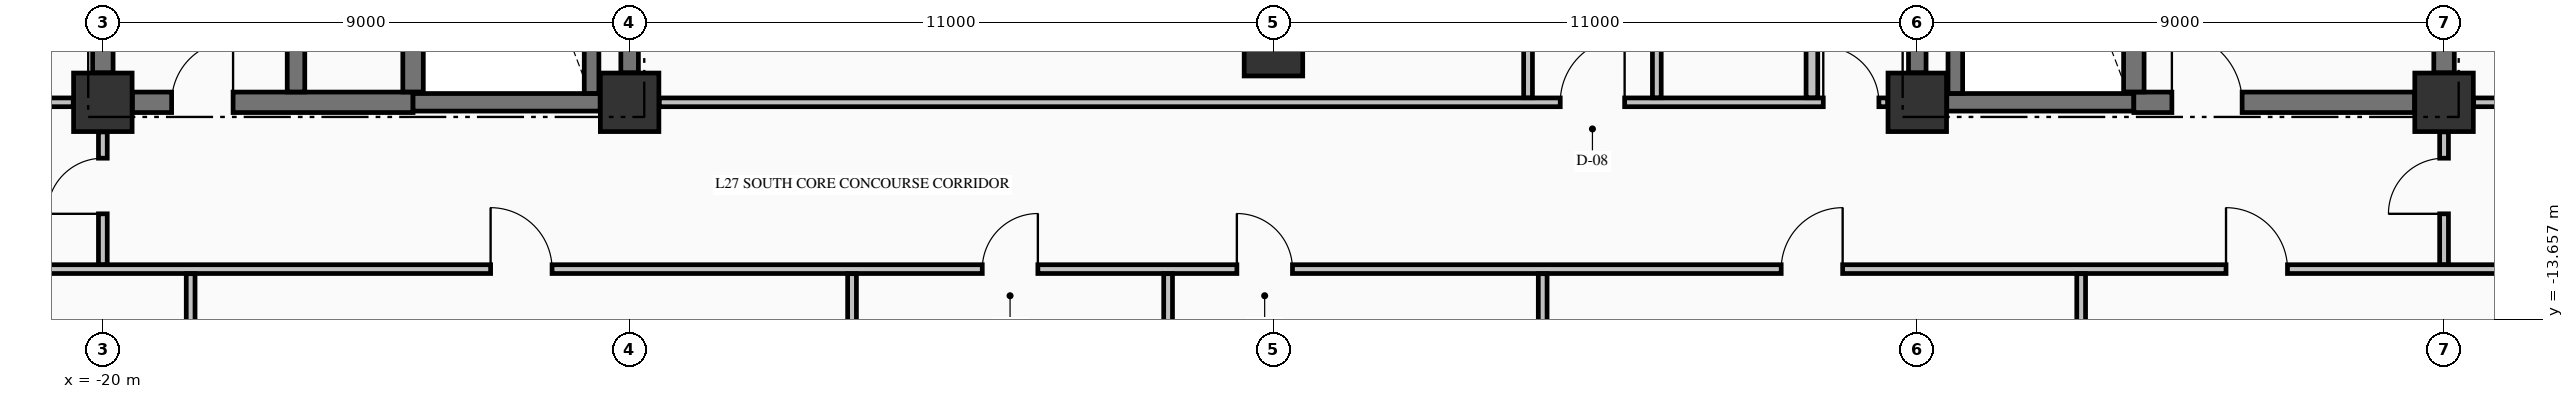
"""IFC4 building model, lengths in metres.
Left out: names, types, materials, properties, quantities, classifications, styles, units other than length and angle.
Written with IfcOpenShell. Run it as: python <this file> out.ifc"""

import sys

from ifc_helpers import new_model, si_unit, direction, frame, frame_2d, origin, origin_2d, place, context, subcontext, project, spatial, rectangle, extrude, element, fill, save


model = new_model("IFC4")
c1 = context("Model", 3, precision=1e-05, world=origin(), true_north=direction((0.0, 1.0)))
c2 = subcontext(c1, "Body", "Model", "MODEL_VIEW")
j1 = project(units=[si_unit("LENGTHUNIT", "METRE"), si_unit("PLANEANGLEUNIT", "RADIAN")], contexts=[c1])
p1 = place(None, origin())
s1 = spatial("IfcSite", under=j1, at=p1, CompositionType="ELEMENT")
p2 = place(p1, origin())
s2 = spatial("IfcBuilding", under=s1, at=p2, CompositionType="ELEMENT")
p3 = place(p2, frame((0.0, 0.0, 109.21)))
s3 = spatial("IfcBuildingStorey", under=s2, at=p3, CompositionType="ELEMENT", Elevation=109.21)
for number, where, z_axis, x_axis in (
    (1, (-20.0, -9.95, -0.25), (0.0, 0.0, 1.0), (1.0, 0.0, 0.0)),
    (2, (-11.0, -9.95, -0.25), (0.0, 0.0, 1.0), (1.0, 0.0, 0.0)),
    (3, (11.0, -9.95, -0.25), (0.0, 0.0, 1.0), (1.0, 0.0, 0.0)),
    (4, (20.0, -9.95, -0.25), (0.0, 0.0, 1.0), (1.0, 0.0, 0.0)),
    (5, (0.0, -9.0, -0.25), (0.0, 0.0, 1.0), (1.0, 0.0, 0.0)),
):
    element("IfcColumn", number, at=place(p3, frame(where, z_axis=z_axis, x_axis=x_axis)), inside=s3, PredefinedType="COLUMN", context=c2, shape_type="SweptSolid", body=[
        extrude(rectangle(XDim=1.0, YDim=1.0, at=origin_2d()), origin(), (0.0, 0.0, 1.0), 3.57),
    ])
p4 = place(p3, frame((-19.496, -9.95, 0.0), z_axis=(0.0, 0.0, 1.0), x_axis=(1.0, 0.0, 0.0)))
e6 = element("IfcWall", 6, at=p4, inside=s3, PredefinedType="SHEAR", context=c2, shape_type="SweptSolid", body=[
    extrude(rectangle(XDim=4.796, YDim=0.35, at=frame_2d((2.398, 0.0))), origin(), (0.0, 0.0, 1.0), 3.32),
])
p5 = place(p4, frame((0.671, 0.0, 0.0)))
e7 = element("IfcOpeningElement", 7, at=p5, cuts=e6, PredefinedType="OPENING", context=c2, shape_type="SweptSolid", body=[
    extrude(rectangle(XDim=1.05, YDim=2.15, at=frame_2d((0.525, 1.075))), frame((0.0, 0.185, 0.0), z_axis=(0.0, -1.0, 0.0), x_axis=(1.0, 0.0, 0.0)), (0.0, 0.0, 1.0), 0.37),
])
for number, where, z_axis, x_axis in (
    (8, (-14.7, -9.95, 0.0), (0.0, 0.0, 1.0), (1.0, 0.0, 0.0)),
    (9, (11.504, -9.95, 0.0), (0.0, 0.0, 1.0), (1.0, 0.0, 0.0)),
):
    element("IfcWall", number, at=place(p3, frame(where, z_axis=z_axis, x_axis=x_axis)), inside=s3, PredefinedType="SHEAR", context=c2, shape_type="SweptSolid", body=[
        extrude(rectangle(XDim=3.196, YDim=0.3, at=frame_2d((1.598, 0.0))), origin(), (0.0, 0.0, 1.0), 3.32),
    ])
p6 = place(p3, frame((14.7, -9.95, 0.0), z_axis=(0.0, 0.0, 1.0), x_axis=(1.0, 0.0, 0.0)))
e10 = element("IfcWall", 10, at=p6, inside=s3, PredefinedType="SHEAR", context=c2, shape_type="SweptSolid", body=[
    extrude(rectangle(XDim=4.796, YDim=0.35, at=frame_2d((2.398, 0.0))), origin(), (0.0, 0.0, 1.0), 3.32),
])
p7 = place(p6, frame((0.65, 0.0, 0.0)))
e11 = element("IfcOpeningElement", 11, at=p7, cuts=e10, PredefinedType="OPENING", context=c2, shape_type="SweptSolid", body=[
    extrude(rectangle(XDim=1.2, YDim=2.15, at=frame_2d((0.6, 1.075))), frame((0.0, 0.185, 0.0), z_axis=(0.0, -1.0, 0.0), x_axis=(1.0, 0.0, 0.0)), (0.0, 0.0, 1.0), 0.37),
])
p8 = place(p3, frame((-22.835, -12.8, 0.0), z_axis=(0.0, 0.0, 1.0), x_axis=(1.0, 0.0, 0.0)))
e12 = element("IfcWall", 12, at=p8, inside=s3, PredefinedType="PARTITIONING", context=c2, shape_type="SweptSolid", body=[
    extrude(rectangle(XDim=50.67, YDim=0.15, at=frame_2d((25.335, 0.0))), origin(), (0.0, 0.0, 1.0), 3.32),
])
p9 = place(p8, frame((9.46, 0.0, 0.0)))
e13 = element("IfcOpeningElement", 13, at=p9, cuts=e12, PredefinedType="OPENING", context=c2, shape_type="SweptSolid", body=[
    extrude(rectangle(XDim=1.05, YDim=2.15, at=frame_2d((0.525, 1.075))), frame((0.0, 0.085, 0.0), z_axis=(0.0, -1.0, 0.0), x_axis=(1.0, 0.0, 0.0)), (0.0, 0.0, 1.0), 0.17),
])
p10 = place(p8, frame((17.86, 0.0, 0.0)))
e14 = element("IfcOpeningElement", 14, at=p10, cuts=e12, PredefinedType="OPENING", context=c2, shape_type="SweptSolid", body=[
    extrude(rectangle(XDim=0.95, YDim=2.15, at=frame_2d((0.475, 1.075))), frame((0.0, 0.085, 0.0), z_axis=(0.0, -1.0, 0.0), x_axis=(1.0, 0.0, 0.0)), (0.0, 0.0, 1.0), 0.17),
])
p11 = place(p8, frame((22.21, 0.0, 0.0)))
e15 = element("IfcOpeningElement", 15, at=p11, cuts=e12, PredefinedType="OPENING", context=c2, shape_type="SweptSolid", body=[
    extrude(rectangle(XDim=0.95, YDim=2.15, at=frame_2d((0.475, 1.075))), frame((0.0, 0.085, 0.0), z_axis=(0.0, -1.0, 0.0), x_axis=(1.0, 0.0, 0.0)), (0.0, 0.0, 1.0), 0.17),
])
p12 = place(p8, frame((31.51, 0.0, 0.0)))
e16 = element("IfcOpeningElement", 16, at=p12, cuts=e12, PredefinedType="OPENING", context=c2, shape_type="SweptSolid", body=[
    extrude(rectangle(XDim=1.05, YDim=2.15, at=frame_2d((0.525, 1.075))), frame((0.0, 0.085, 0.0), z_axis=(0.0, -1.0, 0.0), x_axis=(1.0, 0.0, 0.0)), (0.0, 0.0, 1.0), 0.17),
])
p13 = place(p8, frame((39.11, 0.0, 0.0)))
e17 = element("IfcOpeningElement", 17, at=p13, cuts=e12, PredefinedType="OPENING", context=c2, shape_type="SweptSolid", body=[
    extrude(rectangle(XDim=1.05, YDim=2.15, at=frame_2d((0.525, 1.075))), frame((0.0, 0.085, 0.0), z_axis=(0.0, -1.0, 0.0), x_axis=(1.0, 0.0, 0.0)), (0.0, 0.0, 1.0), 0.17),
])
p14 = place(p3, frame((-22.835, -9.95, 0.0), z_axis=(0.0, 0.0, 1.0), x_axis=(1.0, 0.0, 0.0)))
e18 = element("IfcWall", 18, at=p14, inside=s3, PredefinedType="PARTITIONING", context=c2, shape_type="SweptSolid", body=[
    extrude(rectangle(XDim=2.329, YDim=0.15, at=frame_2d((1.165, 0.0))), origin(), (0.0, 0.0, 1.0), 3.32),
])
p15 = place(p14, frame((0.835, 0.0, 0.0)))
e19 = element("IfcOpeningElement", 19, at=p15, cuts=e18, PredefinedType="OPENING", context=c2, shape_type="SweptSolid", body=[
    extrude(rectangle(XDim=1.0, YDim=2.15, at=frame_2d((0.5, 1.075))), frame((0.0, 0.085, 0.0), z_axis=(0.0, -1.0, 0.0), x_axis=(1.0, 0.0, 0.0)), (0.0, 0.0, 1.0), 0.17),
])
p16 = place(p3, frame((-10.494, -9.95, 0.0), z_axis=(0.0, 0.0, 1.0), x_axis=(1.0, 0.0, 0.0)))
e20 = element("IfcWall", 20, at=p16, inside=s3, PredefinedType="PARTITIONING", context=c2, shape_type="SweptSolid", body=[
    extrude(rectangle(XDim=20.988, YDim=0.15, at=frame_2d((10.494, 0.0))), origin(), (0.0, 0.0, 1.0), 3.32),
])
p17 = place(p16, frame((15.394, 0.0, 0.0)))
e21 = element("IfcOpeningElement", 21, at=p17, cuts=e20, PredefinedType="OPENING", context=c2, shape_type="SweptSolid", body=[
    extrude(rectangle(XDim=1.1, YDim=2.15, at=frame_2d((0.55, 1.075))), frame((0.0, 0.085, 0.0), z_axis=(0.0, -1.0, 0.0), x_axis=(1.0, 0.0, 0.0)), (0.0, 0.0, 1.0), 0.17),
])
p18 = place(p16, frame((19.888, 0.0, 0.0)))
e22 = element("IfcOpeningElement", 22, at=p18, cuts=e20, PredefinedType="OPENING", context=c2, shape_type="SweptSolid", body=[
    extrude(rectangle(XDim=0.95, YDim=2.15, at=frame_2d((0.475, 1.075))), frame((0.0, 0.085, 0.0), z_axis=(0.0, -1.0, 0.0), x_axis=(1.0, 0.0, 0.0)), (0.0, 0.0, 1.0), 0.17),
])
p19 = place(p3, frame((20.506, -9.95, 0.0), z_axis=(0.0, 0.0, 1.0), x_axis=(1.0, 0.0, 0.0)))
e23 = element("IfcWall", 23, at=p19, inside=s3, PredefinedType="PARTITIONING", context=c2, shape_type="SweptSolid", body=[
    extrude(rectangle(XDim=7.329, YDim=0.15, at=frame_2d((3.665, 0.0))), origin(), (0.0, 0.0, 1.0), 3.32),
])
p20 = place(p19, frame((3.019, 0.0, 0.0)))
e24 = element("IfcOpeningElement", 24, at=p20, cuts=e23, PredefinedType="OPENING", context=c2, shape_type="SweptSolid", body=[
    extrude(rectangle(XDim=0.95, YDim=2.15, at=frame_2d((0.475, 1.075))), frame((0.0, 0.085, 0.0), z_axis=(0.0, -1.0, 0.0), x_axis=(1.0, 0.0, 0.0)), (0.0, 0.0, 1.0), 0.17),
])
p21 = place(p3, frame((-20.0, -9.446, 0.0), z_axis=(0.0, 0.0, 1.0), x_axis=(0.0, 1.0, 0.0)))
e25 = element("IfcWall", 25, at=p21, inside=s3, PredefinedType="SHEAR", context=c2, shape_type="SweptSolid", body=[
    extrude(rectangle(XDim=8.942, YDim=0.35, at=frame_2d((4.471, 0.0))), origin(), (0.0, 0.0, 1.0), 3.32),
])
p22 = place(p3, frame((-16.7, -9.773, 0.0), z_axis=(0.0, 0.0, 1.0), x_axis=(0.0, 1.0, 0.0)))
e26 = element("IfcWall", 26, at=p22, inside=s3, PredefinedType="SHEAR", context=c2, shape_type="SweptSolid", body=[
    extrude(rectangle(XDim=9.371, YDim=0.3, at=frame_2d((4.686, 0.0))), origin(), (0.0, 0.0, 1.0), 3.32),
])
p23 = place(p3, frame((-14.7, -9.773, 0.0), z_axis=(0.0, 0.0, 1.0), x_axis=(0.0, 1.0, 0.0)))
e27 = element("IfcWall", 27, at=p23, inside=s3, PredefinedType="SHEAR", context=c2, shape_type="SweptSolid", body=[
    extrude(rectangle(XDim=9.371, YDim=0.35, at=frame_2d((4.686, 0.0))), origin(), (0.0, 0.0, 1.0), 3.32),
])
p24 = place(p3, frame((-11.65, -9.798, 0.0), z_axis=(0.0, 0.0, 1.0), x_axis=(0.0, 1.0, 0.0)))
e28 = element("IfcWall", 28, at=p24, inside=s3, PredefinedType="SOLIDWALL", context=c2, shape_type="SweptSolid", body=[
    extrude(rectangle(XDim=9.396, YDim=0.25, at=frame_2d((4.698, 0.0))), origin(), (0.0, 0.0, 1.0), 3.32),
])
for number, where, z_axis, x_axis in (
    (29, (-11.0, -9.446, 0.0), (0.0, 0.0, 1.0), (0.0, 1.0, 0.0)),
    (30, (11.0, -9.446, 0.0), (0.0, 0.0, 1.0), (0.0, 1.0, 0.0)),
):
    element("IfcWall", number, at=place(p3, frame(where, z_axis=z_axis, x_axis=x_axis)), inside=s3, PredefinedType="SHEAR", context=c2, shape_type="SweptSolid", body=[
        extrude(rectangle(XDim=8.942, YDim=0.3, at=frame_2d((4.471, 0.0))), origin(), (0.0, 0.0, 1.0), 3.32),
    ])
p25 = place(p3, frame((11.65, -9.798, 0.0), z_axis=(0.0, 0.0, 1.0), x_axis=(0.0, 1.0, 0.0)))
e31 = element("IfcWall", 31, at=p25, inside=s3, PredefinedType="SOLIDWALL", context=c2, shape_type="SweptSolid", body=[
    extrude(rectangle(XDim=9.396, YDim=0.25, at=frame_2d((4.698, 0.0))), origin(), (0.0, 0.0, 1.0), 3.32),
])
p26 = place(p3, frame((14.7, -9.773, 0.0), z_axis=(0.0, 0.0, 1.0), x_axis=(0.0, 1.0, 0.0)))
e32 = element("IfcWall", 32, at=p26, inside=s3, PredefinedType="SHEAR", context=c2, shape_type="SweptSolid", body=[
    extrude(rectangle(XDim=9.371, YDim=0.35, at=frame_2d((4.686, 0.0))), origin(), (0.0, 0.0, 1.0), 3.32),
])
p27 = place(p3, frame((20.0, -9.446, 0.0), z_axis=(0.0, 0.0, 1.0), x_axis=(0.0, 1.0, 0.0)))
e33 = element("IfcWall", 33, at=p27, inside=s3, PredefinedType="SHEAR", context=c2, shape_type="SweptSolid", body=[
    extrude(rectangle(XDim=2.269, YDim=0.35, at=frame_2d((1.135, 0.0))), origin(), (0.0, 0.0, 1.0), 3.32),
])
p28 = place(p3, frame((-20.0, -12.722, 0.0), z_axis=(0.0, 0.0, 1.0), x_axis=(0.0, 1.0, 0.0)))
e34 = element("IfcWall", 34, at=p28, inside=s3, PredefinedType="PARTITIONING", context=c2, shape_type="SweptSolid", body=[
    extrude(rectangle(XDim=2.266, YDim=0.15, at=frame_2d((1.133, 0.0))), origin(), (0.0, 0.0, 1.0), 2.81),
])
p29 = place(p28, frame((0.867, 0.0, 0.0)))
e35 = element("IfcOpeningElement", 35, at=p29, cuts=e34, PredefinedType="OPENING", context=c2, shape_type="SweptSolid", body=[
    extrude(rectangle(XDim=0.95, YDim=2.15, at=frame_2d((0.475, 1.075))), frame((0.0, 0.085, 0.0), z_axis=(0.0, -1.0, 0.0), x_axis=(1.0, 0.0, 0.0)), (0.0, 0.0, 1.0), 0.17),
])
p30 = place(p3, frame((-18.5, -20.394, 0.0), z_axis=(0.0, 0.0, 1.0), x_axis=(0.0, 1.0, 0.0)))
e36 = element("IfcWall", 36, at=p30, inside=s3, PredefinedType="PARTITIONING", context=c2, shape_type="SweptSolid", body=[
    extrude(rectangle(XDim=7.516, YDim=0.15, at=frame_2d((3.758, 0.0))), origin(), (0.0, 0.0, 1.0), 3.32),
])
for number, where, z_axis, x_axis in (
    (37, (-7.2, -25.335, 0.0), (0.0, 0.0, 1.0), (0.0, 1.0, 0.0)),
    (38, (-1.8, -25.335, 0.0), (0.0, 0.0, 1.0), (0.0, 1.0, 0.0)),
):
    element("IfcWall", number, at=place(p3, frame(where, z_axis=z_axis, x_axis=x_axis)), inside=s3, PredefinedType="PARTITIONING", context=c2, shape_type="SweptSolid", body=[
        extrude(rectangle(XDim=12.457, YDim=0.15, at=frame_2d((6.229, 0.0))), origin(), (0.0, 0.0, 1.0), 3.32),
    ])
p31 = place(p3, frame((4.35, -9.872, 0.0), z_axis=(0.0, 0.0, 1.0), x_axis=(0.0, 1.0, 0.0)))
e39 = element("IfcWall", 39, at=p31, inside=s3, PredefinedType="PARTITIONING", context=c2, shape_type="SweptSolid", body=[
    extrude(rectangle(XDim=9.544, YDim=0.15, at=frame_2d((4.772, 0.0))), origin(), (0.0, 0.0, 1.0), 3.32),
])
p32 = place(p3, frame((4.6, -25.335, 0.0), z_axis=(0.0, 0.0, 1.0), x_axis=(0.0, 1.0, 0.0)))
e40 = element("IfcWall", 40, at=p32, inside=s3, PredefinedType="PARTITIONING", context=c2, shape_type="SweptSolid", body=[
    extrude(rectangle(XDim=12.457, YDim=0.15, at=frame_2d((6.229, 0.0))), origin(), (0.0, 0.0, 1.0), 3.32),
])
p33 = place(p3, frame((6.55, -9.872, 0.0), z_axis=(0.0, 0.0, 1.0), x_axis=(0.0, 1.0, 0.0)))
e41 = element("IfcWall", 41, at=p33, inside=s3, PredefinedType="PARTITIONING", context=c2, shape_type="SweptSolid", body=[
    extrude(rectangle(XDim=4.419, YDim=0.15, at=frame_2d((2.209, 0.0))), origin(), (0.0, 0.0, 1.0), 3.32),
])
p34 = place(p33, frame((1.997, 0.0, 0.0)))
e42 = element("IfcOpeningElement", 42, at=p34, cuts=e41, PredefinedType="OPENING", context=c2, shape_type="SweptSolid", body=[
    extrude(rectangle(XDim=0.95, YDim=2.15, at=frame_2d((0.475, 1.075))), frame((0.0, 0.085, 0.0), z_axis=(0.0, -1.0, 0.0), x_axis=(1.0, 0.0, 0.0)), (0.0, 0.0, 1.0), 0.17),
])
p35 = place(p3, frame((9.2, -9.872, 0.0), z_axis=(0.0, 0.0, 1.0), x_axis=(0.0, 1.0, 0.0)))
e43 = element("IfcWall", 43, at=p35, inside=s3, PredefinedType="PARTITIONING", context=c2, shape_type="SweptSolid", body=[
    extrude(rectangle(XDim=4.419, YDim=0.2, at=frame_2d((2.209, 0.0))), origin(), (0.0, 0.0, 1.0), 3.32),
])
p36 = place(p3, frame((13.8, -25.335, 0.0), z_axis=(0.0, 0.0, 1.0), x_axis=(0.0, 1.0, 0.0)))
e44 = element("IfcWall", 44, at=p36, inside=s3, PredefinedType="PARTITIONING", context=c2, shape_type="SweptSolid", body=[
    extrude(rectangle(XDim=12.457, YDim=0.15, at=frame_2d((6.229, 0.0))), origin(), (0.0, 0.0, 1.0), 3.32),
])
p37 = place(p3, frame((20.0, -12.722, 0.0), z_axis=(0.0, 0.0, 1.0), x_axis=(0.0, 1.0, 0.0)))
e45 = element("IfcWall", 45, at=p37, inside=s3, PredefinedType="PARTITIONING", context=c2, shape_type="SweptSolid", body=[
    extrude(rectangle(XDim=2.266, YDim=0.15, at=frame_2d((1.133, 0.0))), origin(), (0.0, 0.0, 1.0), 2.81),
])
p38 = place(p37, frame((0.867, 0.0, 0.0)))
e46 = element("IfcOpeningElement", 46, at=p38, cuts=e45, PredefinedType="OPENING", context=c2, shape_type="SweptSolid", body=[
    extrude(rectangle(XDim=0.95, YDim=2.15, at=frame_2d((0.475, 1.075))), frame((0.0, 0.085, 0.0), z_axis=(0.0, -1.0, 0.0), x_axis=(1.0, 0.0, 0.0)), (0.0, 0.0, 1.0), 0.17),
])
p39 = place(p5, origin())
e47 = element("IfcDoor", 47, at=p39, inside=s3, OperationType="SINGLE_SWING_RIGHT", PredefinedType="DOOR", context=c2, shape_type="SweptSolid", body=[
    extrude(rectangle(XDim=1.05, YDim=2.15, at=frame_2d((0.525, 1.075))), frame((0.0, 0.025, 0.0), z_axis=(0.0, -1.0, 0.0), x_axis=(1.0, 0.0, 0.0)), (0.0, 0.0, 1.0), 0.05),
])
fill(e7, e47)
p40 = place(p7, origin())
e48 = element("IfcDoor", 48, at=p40, inside=s3, OperationType="SINGLE_SWING_LEFT", PredefinedType="DOOR", context=c2, shape_type="SweptSolid", body=[
    extrude(rectangle(XDim=1.2, YDim=2.15, at=frame_2d((0.6, 1.075))), frame((0.0, 0.025, 0.0), z_axis=(0.0, -1.0, 0.0), x_axis=(1.0, 0.0, 0.0)), (0.0, 0.0, 1.0), 0.05),
])
fill(e11, e48)
p41 = place(p17, origin())
e49 = element("IfcDoor", 49, at=p41, inside=s3, OperationType="SINGLE_SWING_RIGHT", PredefinedType="DOOR", context=c2, shape_type="SweptSolid", body=[
    extrude(rectangle(XDim=1.1, YDim=2.15, at=frame_2d((0.55, 1.075))), frame((0.0, 0.025, 0.0), z_axis=(0.0, -1.0, 0.0), x_axis=(1.0, 0.0, 0.0)), (0.0, 0.0, 1.0), 0.05),
])
fill(e21, e49)
p42 = place(p9, origin())
e50 = element("IfcDoor", 50, at=p42, inside=s3, OperationType="SINGLE_SWING_LEFT", PredefinedType="DOOR", context=c2, shape_type="SweptSolid", body=[
    extrude(rectangle(XDim=1.05, YDim=2.15, at=frame_2d((0.525, 1.075))), frame((0.0, 0.025, 0.0), z_axis=(0.0, -1.0, 0.0), x_axis=(1.0, 0.0, 0.0)), (0.0, 0.0, 1.0), 0.05),
])
fill(e13, e50)
p43 = place(p10, origin())
e51 = element("IfcDoor", 51, at=p43, inside=s3, OperationType="SINGLE_SWING_RIGHT", PredefinedType="DOOR", context=c2, shape_type="SweptSolid", body=[
    extrude(rectangle(XDim=0.95, YDim=2.15, at=frame_2d((0.475, 1.075))), frame((0.0, 0.025, 0.0), z_axis=(0.0, -1.0, 0.0), x_axis=(1.0, 0.0, 0.0)), (0.0, 0.0, 1.0), 0.05),
])
fill(e14, e51)
p44 = place(p11, origin())
e52 = element("IfcDoor", 52, at=p44, inside=s3, OperationType="SINGLE_SWING_LEFT", PredefinedType="DOOR", context=c2, shape_type="SweptSolid", body=[
    extrude(rectangle(XDim=0.95, YDim=2.15, at=frame_2d((0.475, 1.075))), frame((0.0, 0.025, 0.0), z_axis=(0.0, -1.0, 0.0), x_axis=(1.0, 0.0, 0.0)), (0.0, 0.0, 1.0), 0.05),
])
fill(e15, e52)
p45 = place(p12, origin())
e53 = element("IfcDoor", 53, at=p45, inside=s3, OperationType="SINGLE_SWING_RIGHT", PredefinedType="DOOR", context=c2, shape_type="SweptSolid", body=[
    extrude(rectangle(XDim=1.05, YDim=2.15, at=frame_2d((0.525, 1.075))), frame((0.0, 0.025, 0.0), z_axis=(0.0, -1.0, 0.0), x_axis=(1.0, 0.0, 0.0)), (0.0, 0.0, 1.0), 0.05),
])
fill(e16, e53)
p46 = place(p13, origin())
e54 = element("IfcDoor", 54, at=p46, inside=s3, OperationType="SINGLE_SWING_LEFT", PredefinedType="DOOR", context=c2, shape_type="SweptSolid", body=[
    extrude(rectangle(XDim=1.05, YDim=2.15, at=frame_2d((0.525, 1.075))), frame((0.0, 0.025, 0.0), z_axis=(0.0, -1.0, 0.0), x_axis=(1.0, 0.0, 0.0)), (0.0, 0.0, 1.0), 0.05),
])
fill(e17, e54)
p47 = place(p18, origin())
e55 = element("IfcDoor", 55, at=p47, inside=s3, OperationType="SINGLE_SWING_LEFT", PredefinedType="DOOR", context=c2, shape_type="SweptSolid", body=[
    extrude(rectangle(XDim=0.95, YDim=2.15, at=frame_2d((0.475, 1.075))), frame((0.0, 0.025, 0.0), z_axis=(0.0, -1.0, 0.0), x_axis=(1.0, 0.0, 0.0)), (0.0, 0.0, 1.0), 0.05),
])
fill(e22, e55)
p48 = place(p29, origin())
e56 = element("IfcDoor", 56, at=p48, inside=s3, OperationType="SINGLE_SWING_LEFT", PredefinedType="DOOR", context=c2, shape_type="SweptSolid", body=[
    extrude(rectangle(XDim=0.95, YDim=2.15, at=frame_2d((0.475, 1.075))), frame((0.0, 0.025, 0.0), z_axis=(0.0, -1.0, 0.0), x_axis=(1.0, 0.0, 0.0)), (0.0, 0.0, 1.0), 0.05),
])
fill(e35, e56)
p49 = place(p38, origin())
e57 = element("IfcDoor", 57, at=p49, inside=s3, OperationType="SINGLE_SWING_LEFT", PredefinedType="DOOR", context=c2, shape_type="SweptSolid", body=[
    extrude(rectangle(XDim=0.95, YDim=2.15, at=frame_2d((0.475, 1.075))), frame((0.0, 0.025, 0.0), z_axis=(0.0, -1.0, 0.0), x_axis=(1.0, 0.0, 0.0)), (0.0, 0.0, 1.0), 0.05),
])
fill(e46, e57)
save(model, sys.argv[1])
